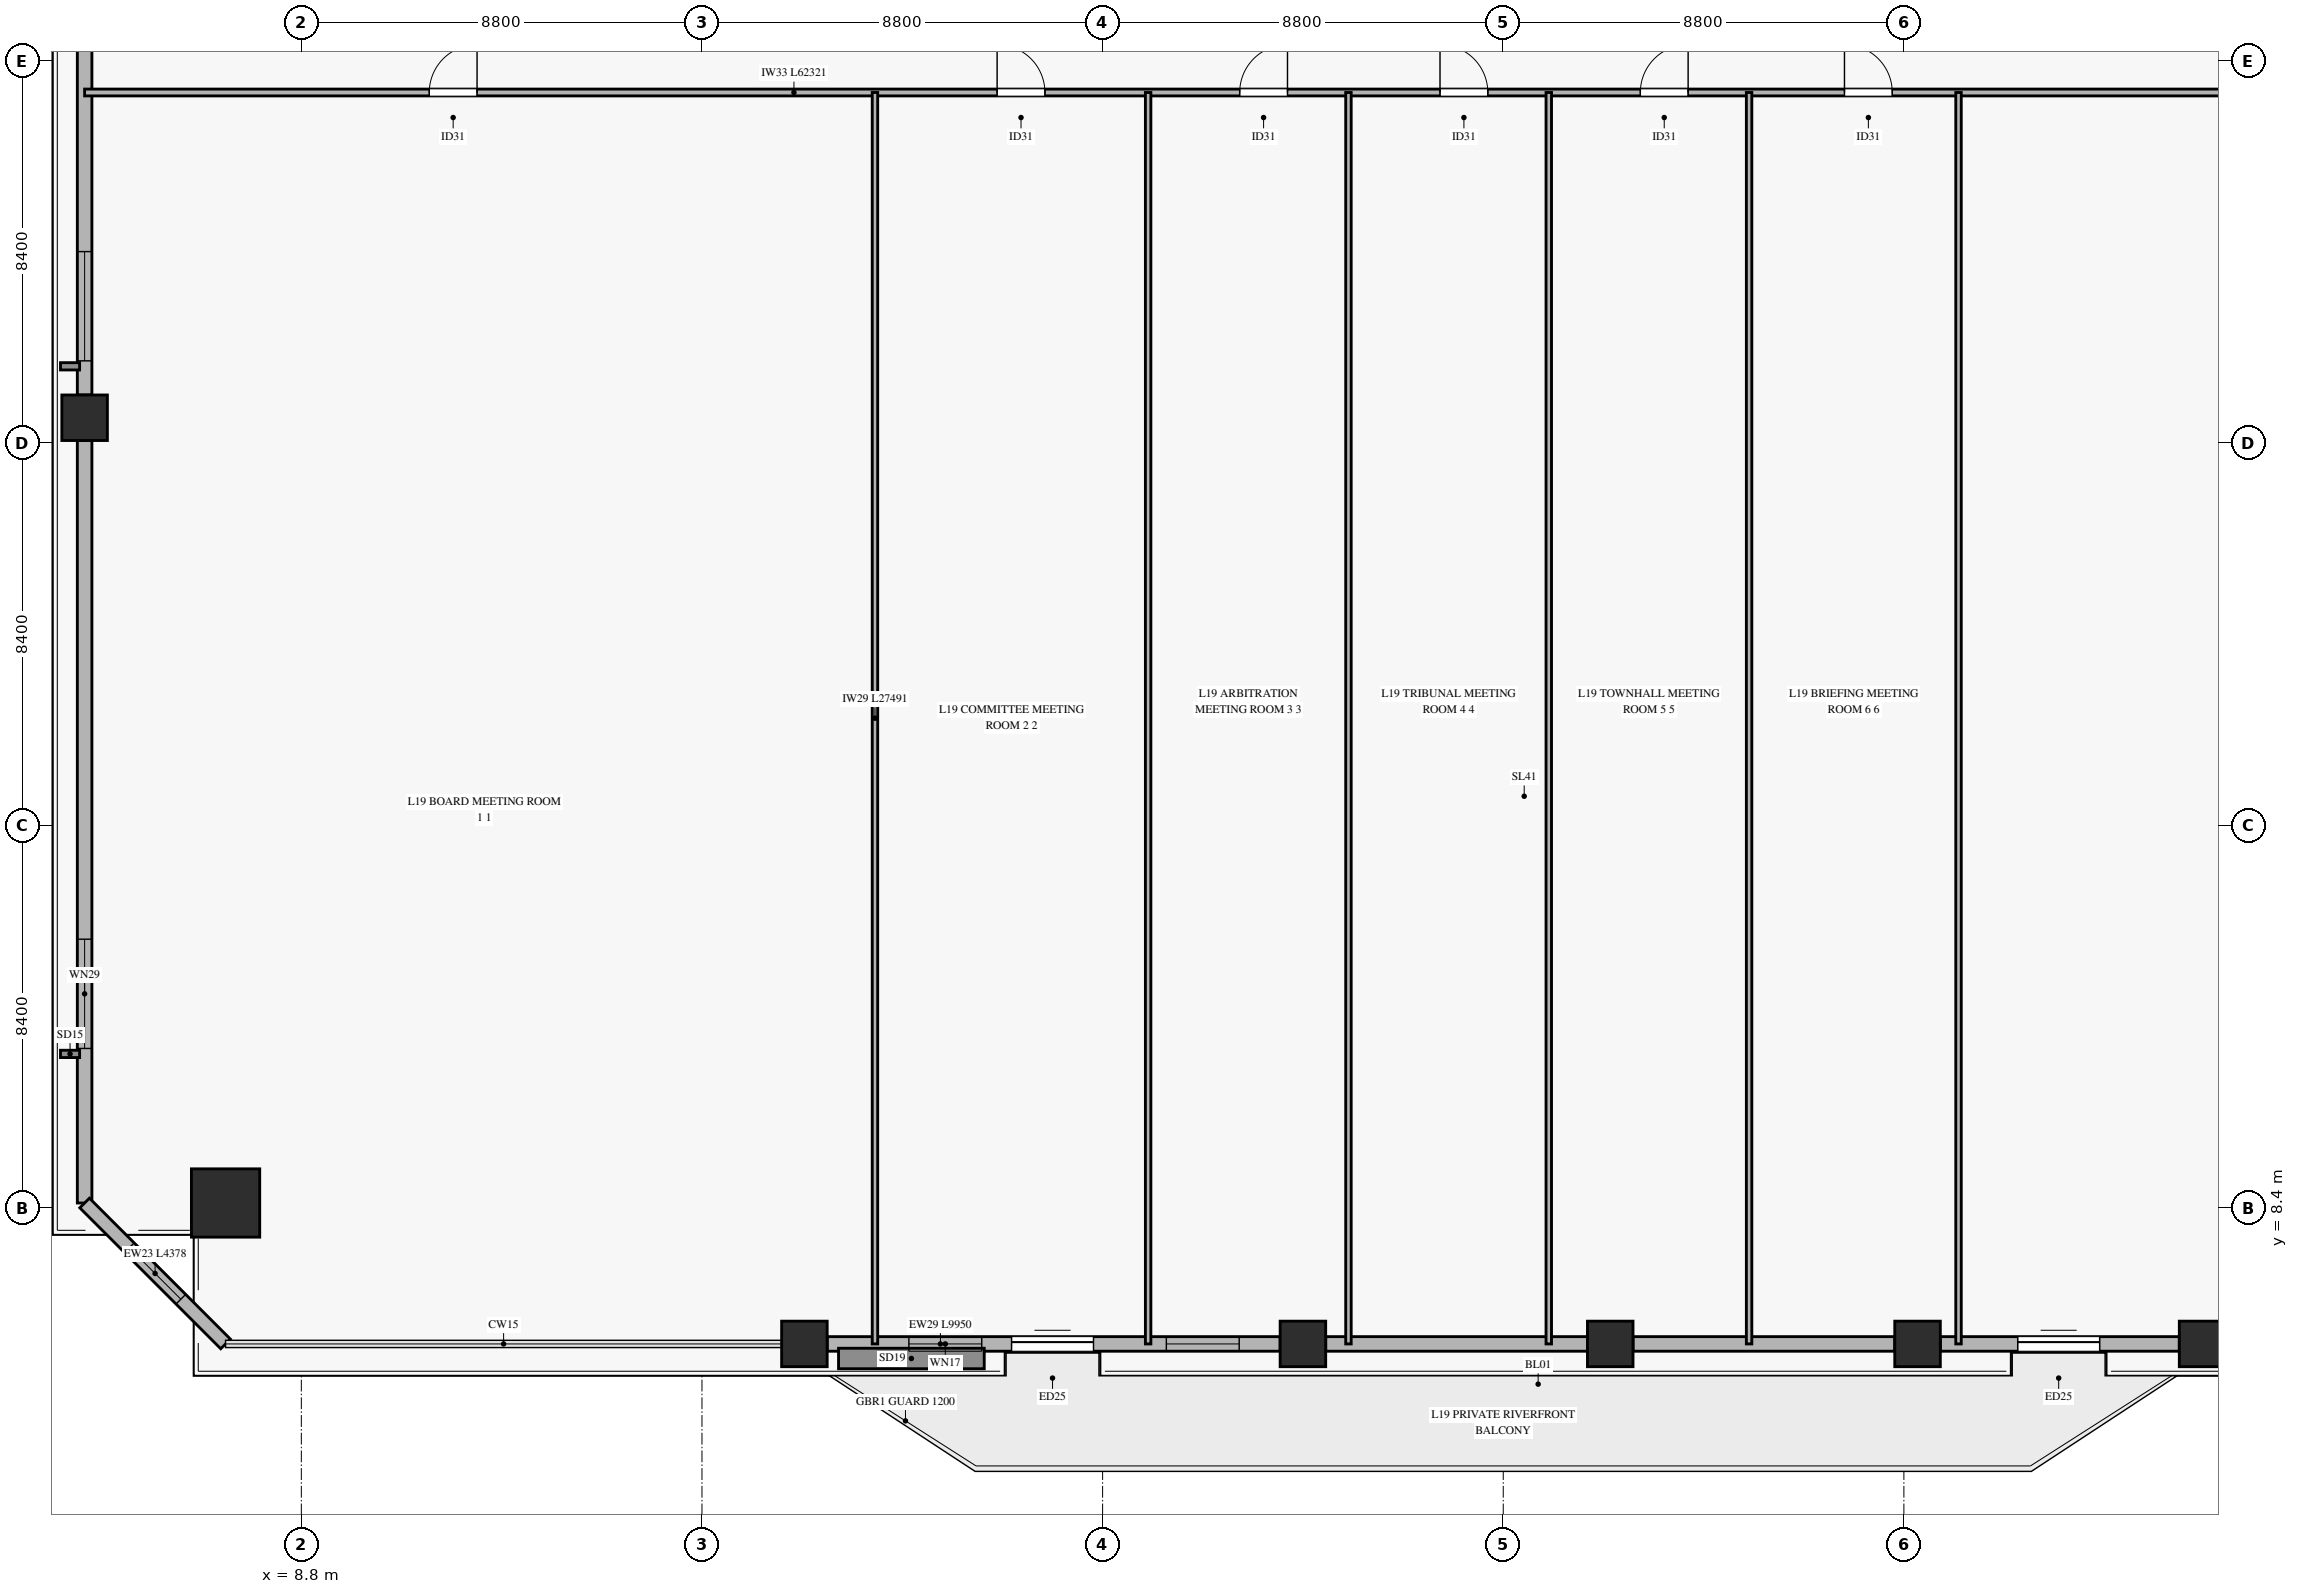
"""IFC4 building model, lengths in metres.
Left out: names, types, materials, properties, quantities, classifications, styles, units other than length and angle.
Written with IfcOpenShell. Run it as: python <this file> out.ifc"""

import sys

from ifc_helpers import new_model, si_unit, direction, frame, frame_2d, origin, origin_2d, place, context, subcontext, project, spatial, rectangle, hollow_rectangle, extrude, source, transform, mapped, element, fill, save


model = new_model("IFC4")
c1 = context("Model", 3, precision=1e-05, world=origin(), true_north=direction((0.0, 1.0)))
c2 = subcontext(c1, "Body", "Model", "MODEL_VIEW")
j1 = project(units=[si_unit("LENGTHUNIT", "METRE"), si_unit("PLANEANGLEUNIT", "RADIAN")], contexts=[c1])
p1 = place(None, origin())
s1 = spatial("IfcSite", under=j1, at=p1, CompositionType="ELEMENT")
p2 = place(p1, origin())
s2 = spatial("IfcBuilding", under=s1, at=p2, CompositionType="ELEMENT")
p3 = place(p2, frame((0.0, 0.0, 79.6)))
s3 = spatial("IfcBuildingStorey", under=s2, at=p3, CompositionType="ELEMENT", Elevation=79.6)
m1 = source(origin(), c2, "Body", "SweptSolid", [
    extrude(hollow_rectangle(XDim=1.5, YDim=1.5, WallThickness=0.07, at=origin_2d()), origin(), (0.0, 0.0, 1.0), 3.68),
])
p4 = place(p3, frame((7.136, 8.505, 0.0), z_axis=(0.0, 0.0, 1.0), x_axis=(1.0, 0.0, 0.0)))
e1 = element("IfcColumn", 1, at=p4, inside=s3, PredefinedType="COLUMN", context=c2, shape_type="MappedRepresentation", body=[
    mapped(m1, transform((0.0, 0.0, 0.0), x_axis=(1.0, 0.0, 0.0), y_axis=(0.0, 1.0, 0.0), z_axis=(0.0, 0.0, 1.0), scale=1.0)),
])
m2 = source(origin(), c2, "Body", "SweptSolid", [
    extrude(hollow_rectangle(XDim=1.0, YDim=1.0, WallThickness=0.045, at=origin_2d()), origin(), (0.0, 0.0, 1.0), 3.68),
])
for number, where, z_axis, x_axis in (
    (2, (19.85, 5.409, 0.0), (0.0, 0.0, 1.0), (1.0, 0.0, 0.0)),
    (3, (30.8, 5.409, 0.0), (0.0, 0.0, 1.0), (1.0, 0.0, 0.0)),
    (4, (37.55, 5.409, 0.0), (0.0, 0.0, 1.0), (1.0, 0.0, 0.0)),
    (5, (44.3, 5.409, 0.0), (0.0, 0.0, 1.0), (1.0, 0.0, 0.0)),
    (6, (50.55, 5.409, 0.0), (0.0, 0.0, 1.0), (1.0, 0.0, 0.0)),
    (7, (4.04, 25.755, 0.0), (0.0, 0.0, 1.0), (1.0, 0.0, 0.0)),
):
    element("IfcColumn", number, at=place(p3, frame(where, z_axis=z_axis, x_axis=x_axis)), inside=s3, PredefinedType="COLUMN", context=c2, shape_type="MappedRepresentation", body=[
        mapped(m2, transform((0.0, 0.0, 0.0), x_axis=(1.0, 0.0, 0.0), y_axis=(0.0, 1.0, 0.0), z_axis=(0.0, 0.0, 1.0), scale=1.0)),
    ])
p5 = place(p3, frame((20.35, 5.409, 0.0), z_axis=(0.0, 0.0, 1.0), x_axis=(1.0, 0.0, 0.0)))
e8 = element("IfcWall", 8, at=p5, inside=s3, PredefinedType="SOLIDWALL", context=c2, shape_type="SweptSolid", body=[
    extrude(rectangle(XDim=9.95, YDim=0.32, at=frame_2d((4.975, 0.0))), origin(), (0.0, 0.0, 1.0), 3.16),
])
p6 = place(p5, frame((4.05, 0.0, 0.0)))
e9 = element("IfcOpeningElement", 9, at=p6, cuts=e8, PredefinedType="OPENING", context=c2, shape_type="SweptSolid", body=[
    extrude(rectangle(XDim=1.8, YDim=2.25, at=frame_2d((0.9, 1.125))), frame((0.0, 0.17, 0.0), z_axis=(0.0, -1.0, 0.0), x_axis=(1.0, 0.0, 0.0)), (0.0, 0.0, 1.0), 0.34),
])
p7 = place(p5, frame((1.795, 0.0, 0.45)))
e10 = element("IfcOpeningElement", 10, at=p7, cuts=e8, PredefinedType="OPENING", context=c2, shape_type="SweptSolid", body=[
    extrude(rectangle(XDim=1.6, YDim=2.0, at=frame_2d((0.8, 1.0))), frame((0.0, 0.17, 0.0), z_axis=(0.0, -1.0, 0.0), x_axis=(1.0, 0.0, 0.0)), (0.0, 0.0, 1.0), 0.34),
])
p8 = place(p5, frame((7.45, 0.0, 0.45)))
e11 = element("IfcOpeningElement", 11, at=p8, cuts=e8, PredefinedType="OPENING", context=c2, shape_type="SweptSolid", body=[
    extrude(rectangle(XDim=1.6, YDim=2.0, at=frame_2d((0.8, 1.0))), frame((0.0, 0.17, 0.0), z_axis=(0.0, -1.0, 0.0), x_axis=(1.0, 0.0, 0.0)), (0.0, 0.0, 1.0), 0.34),
])
for number, where, z_axis, x_axis in (
    (12, (31.3, 5.409, 0.0), (0.0, 0.0, 1.0), (1.0, 0.0, 0.0)),
    (13, (38.05, 5.409, 0.0), (0.0, 0.0, 1.0), (1.0, 0.0, 0.0)),
):
    element("IfcWall", number, at=place(p3, frame(where, z_axis=z_axis, x_axis=x_axis)), inside=s3, PredefinedType="SOLIDWALL", context=c2, shape_type="SweptSolid", body=[
        extrude(rectangle(XDim=5.75, YDim=0.32, at=frame_2d((2.875, 0.0))), origin(), (0.0, 0.0, 1.0), 3.16),
    ])
p9 = place(p3, frame((44.8, 5.409, 0.0), z_axis=(0.0, 0.0, 1.0), x_axis=(1.0, 0.0, 0.0)))
e14 = element("IfcWall", 14, at=p9, inside=s3, PredefinedType="SOLIDWALL", context=c2, shape_type="SweptSolid", body=[
    extrude(rectangle(XDim=5.25, YDim=0.32, at=frame_2d((2.625, 0.0))), origin(), (0.0, 0.0, 1.0), 3.16),
])
p10 = place(p9, frame((1.7, 0.0, 0.0)))
e15 = element("IfcOpeningElement", 15, at=p10, cuts=e14, PredefinedType="OPENING", context=c2, shape_type="SweptSolid", body=[
    extrude(rectangle(XDim=1.8, YDim=2.25, at=frame_2d((0.9, 1.125))), frame((0.0, 0.17, 0.0), z_axis=(0.0, -1.0, 0.0), x_axis=(1.0, 0.0, 0.0)), (0.0, 0.0, 1.0), 0.34),
])
p11 = place(p3, frame((4.04, 8.505, 0.0), z_axis=(0.0, 0.0, 1.0), x_axis=(0.0, 1.0, 0.0)))
e16 = element("IfcWall", 16, at=p11, inside=s3, PredefinedType="SOLIDWALL", context=c2, shape_type="SweptSolid", body=[
    extrude(rectangle(XDim=16.75, YDim=0.32, at=frame_2d((8.375, 0.0))), origin(), (0.0, 0.0, 1.0), 3.16),
])
p12 = place(p11, frame((3.395, 0.0, 0.45)))
e17 = element("IfcOpeningElement", 17, at=p12, cuts=e16, PredefinedType="OPENING", context=c2, shape_type="SweptSolid", body=[
    extrude(rectangle(XDim=2.4, YDim=2.1, at=frame_2d((1.2, 1.05))), frame((0.0, 0.17, 0.0), z_axis=(0.0, -1.0, 0.0), x_axis=(1.0, 0.0, 0.0)), (0.0, 0.0, 1.0), 0.34),
])
p13 = place(p3, frame((4.04, 26.255, 0.0), z_axis=(0.0, 0.0, 1.0), x_axis=(0.0, 1.0, 0.0)))
e18 = element("IfcWall", 18, at=p13, inside=s3, PredefinedType="SOLIDWALL", context=c2, shape_type="SweptSolid", body=[
    extrude(rectangle(XDim=16.749, YDim=0.32, at=frame_2d((8.375, 0.0))), origin(), (0.0, 0.0, 1.0), 3.16),
])
p14 = place(p13, frame((0.75, 0.0, 0.45)))
e19 = element("IfcOpeningElement", 19, at=p14, cuts=e18, PredefinedType="OPENING", context=c2, shape_type="SweptSolid", body=[
    extrude(rectangle(XDim=2.4, YDim=2.1, at=frame_2d((1.2, 1.05))), frame((0.0, 0.17, 0.0), z_axis=(0.0, -1.0, 0.0), x_axis=(1.0, 0.0, 0.0)), (0.0, 0.0, 1.0), 0.34),
])
p15 = place(p13, frame((11.793, 0.0, 0.45)))
e20 = element("IfcOpeningElement", 20, at=p15, cuts=e18, PredefinedType="OPENING", context=c2, shape_type="SweptSolid", body=[
    extrude(rectangle(XDim=2.4, YDim=2.1, at=frame_2d((1.2, 1.05))), frame((0.0, 0.17, 0.0), z_axis=(0.0, -1.0, 0.0), x_axis=(1.0, 0.0, 0.0)), (0.0, 0.0, 1.0), 0.34),
])
p16 = place(p3, frame((4.04, 8.505, 0.0), z_axis=(0.0, 0.0, 1.0), x_axis=(0.707106781187, -0.707106781187, 0.0)))
e21 = element("IfcWall", 21, at=p16, inside=s3, PredefinedType="SOLIDWALL", context=c2, shape_type="SweptSolid", body=[
    extrude(rectangle(XDim=4.378, YDim=0.3, at=frame_2d((2.189, 0.0))), origin(), (0.0, 0.0, 1.0), 3.16),
])
p17 = place(p16, frame((1.389, 0.0, 0.45)))
e22 = element("IfcOpeningElement", 22, at=p17, cuts=e21, PredefinedType="OPENING", context=c2, shape_type="SweptSolid", body=[
    extrude(rectangle(XDim=1.6, YDim=2.0, at=frame_2d((0.8, 1.0))), frame((0.0, 0.16, 0.0), z_axis=(0.0, -1.0, 0.0), x_axis=(1.0, 0.0, 0.0)), (0.0, 0.0, 1.0), 0.32),
])
p18 = place(p3, frame((4.04, 32.9, 0.0), z_axis=(0.0, 0.0, 1.0), x_axis=(1.0, 0.0, 0.0)))
e23 = element("IfcWall", 23, at=p18, inside=s3, PredefinedType="PARTITIONING", context=c2, shape_type="SweptSolid", body=[
    extrude(rectangle(XDim=62.321, YDim=0.15, at=frame_2d((31.161, 0.0))), origin(), (0.0, 0.0, 1.0), 2.765),
])
p19 = place(p18, frame((7.57, 0.0, 0.0)))
e24 = element("IfcOpeningElement", 24, at=p19, cuts=e23, PredefinedType="OPENING", context=c2, shape_type="SweptSolid", body=[
    extrude(rectangle(XDim=1.05, YDim=2.15, at=frame_2d((0.525, 1.075))), frame((0.0, 0.085, 0.0), z_axis=(0.0, -1.0, 0.0), x_axis=(1.0, 0.0, 0.0)), (0.0, 0.0, 1.0), 0.17),
])
p20 = place(p18, frame((20.043, 0.0, 0.0)))
e25 = element("IfcOpeningElement", 25, at=p20, cuts=e23, PredefinedType="OPENING", context=c2, shape_type="SweptSolid", body=[
    extrude(rectangle(XDim=1.05, YDim=2.15, at=frame_2d((0.525, 1.075))), frame((0.0, 0.085, 0.0), z_axis=(0.0, -1.0, 0.0), x_axis=(1.0, 0.0, 0.0)), (0.0, 0.0, 1.0), 0.17),
])
p21 = place(p18, frame((25.371, 0.0, 0.0)))
e26 = element("IfcOpeningElement", 26, at=p21, cuts=e23, PredefinedType="OPENING", context=c2, shape_type="SweptSolid", body=[
    extrude(rectangle(XDim=1.05, YDim=2.15, at=frame_2d((0.525, 1.075))), frame((0.0, 0.085, 0.0), z_axis=(0.0, -1.0, 0.0), x_axis=(1.0, 0.0, 0.0)), (0.0, 0.0, 1.0), 0.17),
])
p22 = place(p18, frame((29.771, 0.0, 0.0)))
e27 = element("IfcOpeningElement", 27, at=p22, cuts=e23, PredefinedType="OPENING", context=c2, shape_type="SweptSolid", body=[
    extrude(rectangle(XDim=1.05, YDim=2.15, at=frame_2d((0.525, 1.075))), frame((0.0, 0.085, 0.0), z_axis=(0.0, -1.0, 0.0), x_axis=(1.0, 0.0, 0.0)), (0.0, 0.0, 1.0), 0.17),
])
p23 = place(p18, frame((34.171, 0.0, 0.0)))
e28 = element("IfcOpeningElement", 28, at=p23, cuts=e23, PredefinedType="OPENING", context=c2, shape_type="SweptSolid", body=[
    extrude(rectangle(XDim=1.05, YDim=2.15, at=frame_2d((0.525, 1.075))), frame((0.0, 0.085, 0.0), z_axis=(0.0, -1.0, 0.0), x_axis=(1.0, 0.0, 0.0)), (0.0, 0.0, 1.0), 0.17),
])
p24 = place(p18, frame((38.655, 0.0, 0.0)))
e29 = element("IfcOpeningElement", 29, at=p24, cuts=e23, PredefinedType="OPENING", context=c2, shape_type="SweptSolid", body=[
    extrude(rectangle(XDim=1.05, YDim=2.15, at=frame_2d((0.525, 1.075))), frame((0.0, 0.085, 0.0), z_axis=(0.0, -1.0, 0.0), x_axis=(1.0, 0.0, 0.0)), (0.0, 0.0, 1.0), 0.17),
])
p25 = place(p18, frame((50.126, 0.0, 0.0)))
e30 = element("IfcOpeningElement", 30, at=p25, cuts=e23, PredefinedType="OPENING", context=c2, shape_type="SweptSolid", body=[
    extrude(rectangle(XDim=1.05, YDim=2.15, at=frame_2d((0.525, 1.075))), frame((0.0, 0.085, 0.0), z_axis=(0.0, -1.0, 0.0), x_axis=(1.0, 0.0, 0.0)), (0.0, 0.0, 1.0), 0.17),
])
for number, where, z_axis, x_axis in (
    (31, (21.4, 5.409, 0.0), (0.0, 0.0, 1.0), (0.0, 1.0, 0.0)),
    (32, (27.4, 5.409, 0.0), (0.0, 0.0, 1.0), (0.0, 1.0, 0.0)),
    (33, (31.8, 5.409, 0.0), (0.0, 0.0, 1.0), (0.0, 1.0, 0.0)),
    (34, (36.2, 5.409, 0.0), (0.0, 0.0, 1.0), (0.0, 1.0, 0.0)),
    (35, (40.6, 5.409, 0.0), (0.0, 0.0, 1.0), (0.0, 1.0, 0.0)),
    (36, (45.2, 5.409, 0.0), (0.0, 0.0, 1.0), (0.0, 1.0, 0.0)),
):
    element("IfcWall", number, at=place(p3, frame(where, z_axis=z_axis, x_axis=x_axis)), inside=s3, PredefinedType="PARTITIONING", context=c2, shape_type="SweptSolid", body=[
        extrude(rectangle(XDim=27.491, YDim=0.12, at=frame_2d((13.746, 0.0))), origin(), (0.0, 0.0, 1.0), 3.165),
    ])
m3 = source(origin(), c2, "Body", "SweptSolid", [
    extrude(rectangle(XDim=1.8, YDim=2.25, at=frame_2d((0.9, 1.125))), frame((0.0, 0.025, 0.0), z_axis=(0.0, -1.0, 0.0), x_axis=(1.0, 0.0, 0.0)), (0.0, 0.0, 1.0), 0.05),
])
p26 = place(p6, origin())
e37 = element("IfcDoor", 37, at=p26, inside=s3, OperationType="SLIDING_TO_LEFT", PredefinedType="DOOR", context=c2, shape_type="MappedRepresentation", body=[
    mapped(m3, transform((0.0, 0.0, 0.0), x_axis=(1.0, 0.0, 0.0), y_axis=(0.0, 1.0, 0.0), z_axis=(0.0, 0.0, 1.0), scale=1.0)),
])
fill(e9, e37)
m4 = source(origin(), c2, "Body", "SweptSolid", [
    extrude(rectangle(XDim=1.6, YDim=2.0, at=frame_2d((0.8, 1.0))), frame((0.0, 0.03, 0.0), z_axis=(0.0, -1.0, 0.0), x_axis=(1.0, 0.0, 0.0)), (0.0, 0.0, 1.0), 0.06),
])
p27 = place(p7, origin())
e38 = element("IfcWindow", 38, at=p27, inside=s3, PartitioningType="SINGLE_PANEL", PredefinedType="WINDOW", context=c2, shape_type="MappedRepresentation", body=[
    mapped(m4, transform((0.0, 0.0, 0.0), x_axis=(1.0, 0.0, 0.0), y_axis=(0.0, 1.0, 0.0), z_axis=(0.0, 0.0, 1.0), scale=1.0)),
])
fill(e10, e38)
p28 = place(p8, origin())
e39 = element("IfcWindow", 39, at=p28, inside=s3, PartitioningType="SINGLE_PANEL", PredefinedType="WINDOW", context=c2, shape_type="MappedRepresentation", body=[
    mapped(m4, transform((0.0, 0.0, 0.0), x_axis=(1.0, 0.0, 0.0), y_axis=(0.0, 1.0, 0.0), z_axis=(0.0, 0.0, 1.0), scale=1.0)),
])
fill(e11, e39)
p29 = place(p10, origin())
e40 = element("IfcDoor", 40, at=p29, inside=s3, OperationType="SLIDING_TO_LEFT", PredefinedType="DOOR", context=c2, shape_type="MappedRepresentation", body=[
    mapped(m3, transform((0.0, 0.0, 0.0), x_axis=(1.0, 0.0, 0.0), y_axis=(0.0, 1.0, 0.0), z_axis=(0.0, 0.0, 1.0), scale=1.0)),
])
fill(e15, e40)
m5 = source(origin(), c2, "Body", "SweptSolid", [
    extrude(rectangle(XDim=2.4, YDim=2.1, at=frame_2d((1.2, 1.05))), frame((0.0, 0.03, 0.0), z_axis=(0.0, -1.0, 0.0), x_axis=(1.0, 0.0, 0.0)), (0.0, 0.0, 1.0), 0.06),
])
p30 = place(p12, origin())
e41 = element("IfcWindow", 41, at=p30, inside=s3, PartitioningType="SINGLE_PANEL", PredefinedType="WINDOW", context=c2, shape_type="MappedRepresentation", body=[
    mapped(m5, transform((0.0, 0.0, 0.0), x_axis=(1.0, 0.0, 0.0), y_axis=(0.0, 1.0, 0.0), z_axis=(0.0, 0.0, 1.0), scale=1.0)),
])
fill(e17, e41)
p31 = place(p14, origin())
e42 = element("IfcWindow", 42, at=p31, inside=s3, PartitioningType="SINGLE_PANEL", PredefinedType="WINDOW", context=c2, shape_type="MappedRepresentation", body=[
    mapped(m5, transform((0.0, 0.0, 0.0), x_axis=(1.0, 0.0, 0.0), y_axis=(0.0, 1.0, 0.0), z_axis=(0.0, 0.0, 1.0), scale=1.0)),
])
fill(e19, e42)
p32 = place(p17, origin())
e43 = element("IfcWindow", 43, at=p32, inside=s3, PartitioningType="SINGLE_PANEL", PredefinedType="WINDOW", context=c2, shape_type="MappedRepresentation", body=[
    mapped(m4, transform((0.0, 0.0, 0.0), x_axis=(1.0, 0.0, 0.0), y_axis=(0.0, 1.0, 0.0), z_axis=(0.0, 0.0, 1.0), scale=1.0)),
])
fill(e22, e43)
m6 = source(origin(), c2, "Body", "SweptSolid", [
    extrude(rectangle(XDim=1.05, YDim=2.15, at=frame_2d((0.525, 1.075))), frame((0.0, 0.025, 0.0), z_axis=(0.0, -1.0, 0.0), x_axis=(1.0, 0.0, 0.0)), (0.0, 0.0, 1.0), 0.05),
])
p33 = place(p19, origin())
e44 = element("IfcDoor", 44, at=p33, inside=s3, OperationType="SINGLE_SWING_RIGHT", PredefinedType="DOOR", context=c2, shape_type="MappedRepresentation", body=[
    mapped(m6, transform((0.0, 0.0, 0.0), x_axis=(1.0, 0.0, 0.0), y_axis=(0.0, 1.0, 0.0), z_axis=(0.0, 0.0, 1.0), scale=1.0)),
])
fill(e24, e44)
p34 = place(p20, origin())
e45 = element("IfcDoor", 45, at=p34, inside=s3, OperationType="SINGLE_SWING_LEFT", PredefinedType="DOOR", context=c2, shape_type="MappedRepresentation", body=[
    mapped(m6, transform((0.0, 0.0, 0.0), x_axis=(1.0, 0.0, 0.0), y_axis=(0.0, 1.0, 0.0), z_axis=(0.0, 0.0, 1.0), scale=1.0)),
])
fill(e25, e45)
p35 = place(p21, origin())
e46 = element("IfcDoor", 46, at=p35, inside=s3, OperationType="SINGLE_SWING_RIGHT", PredefinedType="DOOR", context=c2, shape_type="MappedRepresentation", body=[
    mapped(m6, transform((0.0, 0.0, 0.0), x_axis=(1.0, 0.0, 0.0), y_axis=(0.0, 1.0, 0.0), z_axis=(0.0, 0.0, 1.0), scale=1.0)),
])
fill(e26, e46)
p36 = place(p22, origin())
e47 = element("IfcDoor", 47, at=p36, inside=s3, OperationType="SINGLE_SWING_LEFT", PredefinedType="DOOR", context=c2, shape_type="MappedRepresentation", body=[
    mapped(m6, transform((0.0, 0.0, 0.0), x_axis=(1.0, 0.0, 0.0), y_axis=(0.0, 1.0, 0.0), z_axis=(0.0, 0.0, 1.0), scale=1.0)),
])
fill(e27, e47)
p37 = place(p23, origin())
e48 = element("IfcDoor", 48, at=p37, inside=s3, OperationType="SINGLE_SWING_RIGHT", PredefinedType="DOOR", context=c2, shape_type="MappedRepresentation", body=[
    mapped(m6, transform((0.0, 0.0, 0.0), x_axis=(1.0, 0.0, 0.0), y_axis=(0.0, 1.0, 0.0), z_axis=(0.0, 0.0, 1.0), scale=1.0)),
])
fill(e28, e48)
p38 = place(p24, origin())
e49 = element("IfcDoor", 49, at=p38, inside=s3, OperationType="SINGLE_SWING_LEFT", PredefinedType="DOOR", context=c2, shape_type="MappedRepresentation", body=[
    mapped(m6, transform((0.0, 0.0, 0.0), x_axis=(1.0, 0.0, 0.0), y_axis=(0.0, 1.0, 0.0), z_axis=(0.0, 0.0, 1.0), scale=1.0)),
])
fill(e29, e49)
save(model, sys.argv[1])
